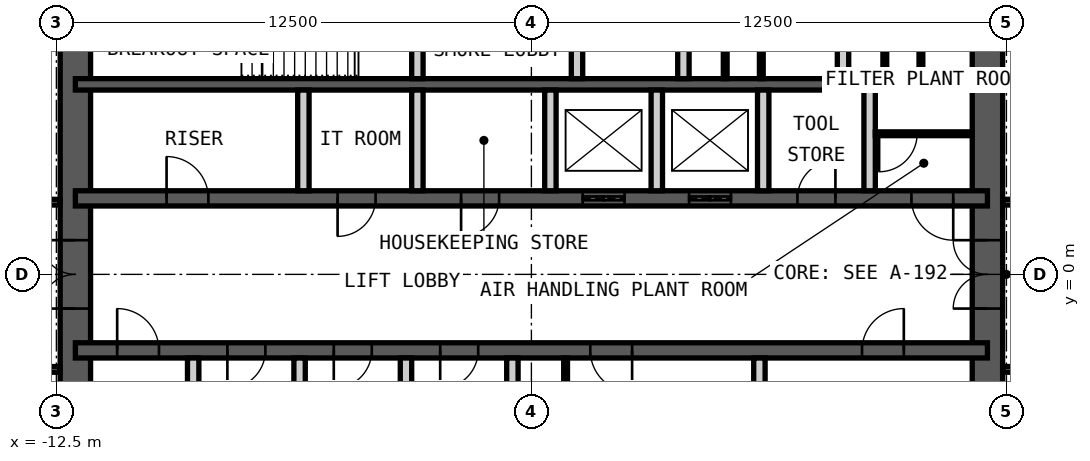
"""IFC4 building model, lengths in metres.
Left out: names, types, materials, properties, quantities, classifications, styles, units other than length and angle.
Written with IfcOpenShell. Run it as: python <this file> out.ifc"""

import sys

from ifc_helpers import new_model, si_unit, direction, frame, frame_2d, origin, place, context, subcontext, project, spatial, rectangle, extrude, element, fill, save


model = new_model("IFC4")
c1 = context("Model", 3, precision=1e-05, world=origin(), true_north=direction((0.0, 1.0)))
c2 = subcontext(c1, "Body", "Model", "MODEL_VIEW")
j1 = project(units=[si_unit("LENGTHUNIT", "METRE"), si_unit("PLANEANGLEUNIT", "RADIAN")], contexts=[c1])
p1 = place(None, origin())
s1 = spatial("IfcSite", under=j1, at=p1, CompositionType="ELEMENT")
p2 = place(p1, origin())
s2 = spatial("IfcBuilding", under=s1, at=p2, CompositionType="ELEMENT")
p3 = place(p2, frame((0.0, 0.0, 308.2)))
s3 = spatial("IfcBuildingStorey", under=s2, at=p3, CompositionType="ELEMENT", Elevation=308.2)
p4 = place(p3, frame((12.0, -9.0, 0.0), z_axis=(0.0, 0.0, 1.0), x_axis=(0.0, 1.0, 0.0)))
e1 = element("IfcWall", 1, at=p4, inside=s3, PredefinedType="SHEAR", context=c2, shape_type="SweptSolid", body=[
    extrude(rectangle(XDim=18.0, YDim=0.8, at=frame_2d((9.0, 0.0))), origin(), (0.0, 0.0, 1.0), 4.2),
])
p5 = place(p4, frame((8.1, 0.0, 0.0)))
e2 = element("IfcOpeningElement", 2, at=p5, cuts=e1, PredefinedType="OPENING", context=c2, shape_type="SweptSolid", body=[
    extrude(rectangle(XDim=1.8, YDim=2.1, at=frame_2d((0.9, 1.05))), frame((0.0, 0.41, 0.0), z_axis=(0.0, -1.0, 0.0), x_axis=(1.0, 0.0, 0.0)), (0.0, 0.0, 1.0), 0.82),
])
p6 = place(p3, frame((-12.0, -9.0, 0.0), z_axis=(0.0, 0.0, 1.0), x_axis=(0.0, 1.0, 0.0)))
e3 = element("IfcWall", 3, at=p6, inside=s3, PredefinedType="SHEAR", context=c2, shape_type="SweptSolid", body=[
    extrude(rectangle(XDim=18.0, YDim=0.8, at=frame_2d((9.0, 0.0))), origin(), (0.0, 0.0, 1.0), 4.2),
])
p7 = place(p6, frame((8.1, 0.0, 0.0)))
e4 = element("IfcOpeningElement", 4, at=p7, cuts=e3, PredefinedType="OPENING", context=c2, shape_type="SweptSolid", body=[
    extrude(rectangle(XDim=1.8, YDim=2.1, at=frame_2d((0.9, 1.05))), frame((0.0, 0.41, 0.0), z_axis=(0.0, -1.0, 0.0), x_axis=(1.0, 0.0, 0.0)), (0.0, 0.0, 1.0), 0.82),
])
p8 = place(p3, frame((-12.0, 5.0, 0.0), z_axis=(0.0, 0.0, 1.0), x_axis=(1.0, 0.0, 0.0)))
e5 = element("IfcWall", 5, at=p8, inside=s3, PredefinedType="SHEAR", context=c2, shape_type="SweptSolid", body=[
    extrude(rectangle(XDim=24.0, YDim=0.3, at=frame_2d((12.0, 0.0))), origin(), (0.0, 0.0, 1.0), 4.2),
])
p9 = place(p3, frame((-12.0, 2.0, 0.0), z_axis=(0.0, 0.0, 1.0), x_axis=(1.0, 0.0, 0.0)))
e6 = element("IfcWall", 6, at=p9, inside=s3, PredefinedType="SHEAR", context=c2, shape_type="SweptSolid", body=[
    extrude(rectangle(XDim=24.0, YDim=0.4, at=frame_2d((12.0, 0.0))), origin(), (0.0, 0.0, 1.0), 4.2),
])
p10 = place(p9, frame((2.4, 0.0, 0.0)))
e7 = element("IfcOpeningElement", 7, at=p10, cuts=e6, PredefinedType="OPENING", context=c2, shape_type="SweptSolid", body=[
    extrude(rectangle(XDim=1.1, YDim=2.1, at=frame_2d((0.55, 1.05))), frame((0.0, 0.21, 0.0), z_axis=(0.0, -1.0, 0.0), x_axis=(1.0, 0.0, 0.0)), (0.0, 0.0, 1.0), 0.42),
])
p11 = place(p9, frame((22.0, 0.0, 0.0)))
e8 = element("IfcOpeningElement", 8, at=p11, cuts=e6, PredefinedType="OPENING", context=c2, shape_type="SweptSolid", body=[
    extrude(rectangle(XDim=1.1, YDim=2.1, at=frame_2d((0.55, 1.05))), frame((0.0, 0.21, 0.0), z_axis=(0.0, -1.0, 0.0), x_axis=(1.0, 0.0, 0.0)), (0.0, 0.0, 1.0), 0.42),
])
p12 = place(p9, frame((10.15, 0.0, 0.0)))
e9 = element("IfcOpeningElement", 9, at=p12, cuts=e6, PredefinedType="OPENING", context=c2, shape_type="SweptSolid", body=[
    extrude(rectangle(XDim=1.0, YDim=2.1, at=frame_2d((0.5, 1.05))), frame((0.0, 0.21, 0.0), z_axis=(0.0, -1.0, 0.0), x_axis=(1.0, 0.0, 0.0)), (0.0, 0.0, 1.0), 0.42),
])
p13 = place(p9, frame((6.9, 0.0, 0.0)))
e10 = element("IfcOpeningElement", 10, at=p13, cuts=e6, PredefinedType="OPENING", context=c2, shape_type="SweptSolid", body=[
    extrude(rectangle(XDim=1.0, YDim=2.1, at=frame_2d((0.5, 1.05))), frame((0.0, 0.21, 0.0), z_axis=(0.0, -1.0, 0.0), x_axis=(1.0, 0.0, 0.0)), (0.0, 0.0, 1.0), 0.42),
])
p14 = place(p9, frame((13.35, 0.0, 0.0)))
e11 = element("IfcOpeningElement", 11, at=p14, cuts=e6, PredefinedType="OPENING", context=c2, shape_type="SweptSolid", body=[
    extrude(rectangle(XDim=1.1, YDim=2.4, at=frame_2d((0.55, 1.2))), frame((0.0, 0.21, 0.0), z_axis=(0.0, -1.0, 0.0), x_axis=(1.0, 0.0, 0.0)), (0.0, 0.0, 1.0), 0.42),
])
p15 = place(p9, frame((16.15, 0.0, 0.0)))
e12 = element("IfcOpeningElement", 12, at=p15, cuts=e6, PredefinedType="OPENING", context=c2, shape_type="SweptSolid", body=[
    extrude(rectangle(XDim=1.1, YDim=2.4, at=frame_2d((0.55, 1.2))), frame((0.0, 0.21, 0.0), z_axis=(0.0, -1.0, 0.0), x_axis=(1.0, 0.0, 0.0)), (0.0, 0.0, 1.0), 0.42),
])
p16 = place(p9, frame((19.0, 0.0, 0.0)))
e13 = element("IfcOpeningElement", 13, at=p16, cuts=e6, PredefinedType="OPENING", context=c2, shape_type="SweptSolid", body=[
    extrude(rectangle(XDim=1.0, YDim=2.1, at=frame_2d((0.5, 1.05))), frame((0.0, 0.21, 0.0), z_axis=(0.0, -1.0, 0.0), x_axis=(1.0, 0.0, 0.0)), (0.0, 0.0, 1.0), 0.42),
])
p17 = place(p3, frame((-12.0, -2.0, 0.0), z_axis=(0.0, 0.0, 1.0), x_axis=(1.0, 0.0, 0.0)))
e14 = element("IfcWall", 14, at=p17, inside=s3, PredefinedType="SHEAR", context=c2, shape_type="SweptSolid", body=[
    extrude(rectangle(XDim=24.0, YDim=0.4, at=frame_2d((12.0, 0.0))), origin(), (0.0, 0.0, 1.0), 4.2),
])
p18 = place(p17, frame((1.1, 0.0, 0.0)))
e15 = element("IfcOpeningElement", 15, at=p18, cuts=e14, PredefinedType="OPENING", context=c2, shape_type="SweptSolid", body=[
    extrude(rectangle(XDim=1.1, YDim=2.1, at=frame_2d((0.55, 1.05))), frame((0.0, 0.21, 0.0), z_axis=(0.0, -1.0, 0.0), x_axis=(1.0, 0.0, 0.0)), (0.0, 0.0, 1.0), 0.42),
])
p19 = place(p17, frame((13.55, 0.0, 0.0)))
e16 = element("IfcOpeningElement", 16, at=p19, cuts=e14, PredefinedType="OPENING", context=c2, shape_type="SweptSolid", body=[
    extrude(rectangle(XDim=1.1, YDim=2.1, at=frame_2d((0.55, 1.05))), frame((0.0, 0.21, 0.0), z_axis=(0.0, -1.0, 0.0), x_axis=(1.0, 0.0, 0.0)), (0.0, 0.0, 1.0), 0.42),
])
p20 = place(p17, frame((20.7, 0.0, 0.0)))
e17 = element("IfcOpeningElement", 17, at=p20, cuts=e14, PredefinedType="OPENING", context=c2, shape_type="SweptSolid", body=[
    extrude(rectangle(XDim=1.1, YDim=2.1, at=frame_2d((0.55, 1.05))), frame((0.0, 0.21, 0.0), z_axis=(0.0, -1.0, 0.0), x_axis=(1.0, 0.0, 0.0)), (0.0, 0.0, 1.0), 0.42),
])
p21 = place(p17, frame((4.0, 0.0, 0.0)))
e18 = element("IfcOpeningElement", 18, at=p21, cuts=e14, PredefinedType="OPENING", context=c2, shape_type="SweptSolid", body=[
    extrude(rectangle(XDim=1.0, YDim=2.1, at=frame_2d((0.5, 1.05))), frame((0.0, 0.21, 0.0), z_axis=(0.0, -1.0, 0.0), x_axis=(1.0, 0.0, 0.0)), (0.0, 0.0, 1.0), 0.42),
])
p22 = place(p17, frame((6.8, 0.0, 0.0)))
e19 = element("IfcOpeningElement", 19, at=p22, cuts=e14, PredefinedType="OPENING", context=c2, shape_type="SweptSolid", body=[
    extrude(rectangle(XDim=1.0, YDim=2.1, at=frame_2d((0.5, 1.05))), frame((0.0, 0.21, 0.0), z_axis=(0.0, -1.0, 0.0), x_axis=(1.0, 0.0, 0.0)), (0.0, 0.0, 1.0), 0.42),
])
p23 = place(p17, frame((9.6, 0.0, 0.0)))
e20 = element("IfcOpeningElement", 20, at=p23, cuts=e14, PredefinedType="OPENING", context=c2, shape_type="SweptSolid", body=[
    extrude(rectangle(XDim=1.0, YDim=2.1, at=frame_2d((0.5, 1.05))), frame((0.0, 0.21, 0.0), z_axis=(0.0, -1.0, 0.0), x_axis=(1.0, 0.0, 0.0)), (0.0, 0.0, 1.0), 0.42),
])
p24 = place(p3, frame((-3.0, 5.15, 0.0), z_axis=(0.0, 0.0, 1.0), x_axis=(0.0, 1.0, 0.0)))
e21 = element("IfcWall", 21, at=p24, inside=s3, PredefinedType="PARTITIONING", context=c2, shape_type="SweptSolid", body=[
    extrude(rectangle(XDim=3.85, YDim=0.3, at=frame_2d((1.925, 0.0))), origin(), (0.0, 0.0, 1.0), 3.98),
])
p25 = place(p24, frame((1.425, 0.0, 0.0)))
e22 = element("IfcOpeningElement", 22, at=p25, cuts=e21, PredefinedType="OPENING", context=c2, shape_type="SweptSolid", body=[
    extrude(rectangle(XDim=1.0, YDim=2.1, at=frame_2d((0.5, 1.05))), frame((0.0, 0.16, 0.0), z_axis=(0.0, -1.0, 0.0), x_axis=(1.0, 0.0, 0.0)), (0.0, 0.0, 1.0), 0.32),
])
p26 = place(p3, frame((1.2, 5.15, 0.0), z_axis=(0.0, 0.0, 1.0), x_axis=(0.0, 1.0, 0.0)))
e23 = element("IfcWall", 23, at=p26, inside=s3, PredefinedType="PARTITIONING", context=c2, shape_type="SweptSolid", body=[
    extrude(rectangle(XDim=3.85, YDim=0.3, at=frame_2d((1.925, 0.0))), origin(), (0.0, 0.0, 1.0), 3.98),
])
p27 = place(p26, frame((1.375, 0.0, 0.0)))
e24 = element("IfcOpeningElement", 24, at=p27, cuts=e23, PredefinedType="OPENING", context=c2, shape_type="SweptSolid", body=[
    extrude(rectangle(XDim=1.1, YDim=2.4, at=frame_2d((0.55, 1.2))), frame((0.0, 0.16, 0.0), z_axis=(0.0, -1.0, 0.0), x_axis=(1.0, 0.0, 0.0)), (0.0, 0.0, 1.0), 0.32),
])
for number, where, z_axis, x_axis in (
    (25, (4.0, 5.15, 0.0), (0.0, 0.0, 1.0), (0.0, 1.0, 0.0)),
    (26, (8.2, 5.15, 0.0), (0.0, 0.0, 1.0), (0.0, 1.0, 0.0)),
):
    element("IfcWall", number, at=place(p3, frame(where, z_axis=z_axis, x_axis=x_axis)), inside=s3, PredefinedType="PARTITIONING", context=c2, shape_type="SweptSolid", body=[
        extrude(rectangle(XDim=3.85, YDim=0.3, at=frame_2d((1.925, 0.0))), origin(), (0.0, 0.0, 1.0), 3.98),
    ])
for number, where, z_axis, x_axis in (
    (27, (-6.0, 2.2, 0.0), (0.0, 0.0, 1.0), (0.0, 1.0, 0.0)),
    (28, (-3.0, 2.2, 0.0), (0.0, 0.0, 1.0), (0.0, 1.0, 0.0)),
    (29, (0.5, 2.2, 0.0), (0.0, 0.0, 1.0), (0.0, 1.0, 0.0)),
    (30, (3.3, 2.2, 0.0), (0.0, 0.0, 1.0), (0.0, 1.0, 0.0)),
    (31, (6.1, 2.2, 0.0), (0.0, 0.0, 1.0), (0.0, 1.0, 0.0)),
    (32, (8.9, 2.2, 0.0), (0.0, 0.0, 1.0), (0.0, 1.0, 0.0)),
    (33, (-8.9, -4.85, 0.0), (0.0, 0.0, 1.0), (0.0, 1.0, 0.0)),
    (34, (-6.1, -4.85, 0.0), (0.0, 0.0, 1.0), (0.0, 1.0, 0.0)),
    (35, (-3.3, -4.85, 0.0), (0.0, 0.0, 1.0), (0.0, 1.0, 0.0)),
    (36, (-0.5, -4.85, 0.0), (0.0, 0.0, 1.0), (0.0, 1.0, 0.0)),
    (37, (6.0, -4.85, 0.0), (0.0, 0.0, 1.0), (0.0, 1.0, 0.0)),
):
    element("IfcWall", number, at=place(p3, frame(where, z_axis=z_axis, x_axis=x_axis)), inside=s3, PredefinedType="PARTITIONING", context=c2, shape_type="SweptSolid", body=[
        extrude(rectangle(XDim=2.65, YDim=0.3, at=frame_2d((1.325, 0.0))), origin(), (0.0, 0.0, 1.0), 3.98),
    ])
p28 = place(p3, frame((0.9, -4.85, 0.0), z_axis=(0.0, 0.0, 1.0), x_axis=(0.0, 1.0, 0.0)))
e38 = element("IfcWall", 38, at=p28, inside=s3, PredefinedType="PARTITIONING", context=c2, shape_type="SweptSolid", body=[
    extrude(rectangle(XDim=2.65, YDim=0.1, at=frame_2d((1.325, 0.0))), origin(), (0.0, 0.0, 1.0), 3.98),
])
p29 = place(p28, frame((0.1, 0.0, 0.0)))
e39 = element("IfcOpeningElement", 39, at=p29, cuts=e38, PredefinedType="OPENING", context=c2, shape_type="SweptSolid", body=[
    extrude(rectangle(XDim=1.0, YDim=2.4, at=frame_2d((0.5, 1.2))), frame((0.0, 0.06, 0.0), z_axis=(0.0, -1.0, 0.0), x_axis=(1.0, 0.0, 0.0)), (0.0, 0.0, 1.0), 0.12),
])
p30 = place(p3, frame((9.05, 3.7, 0.0), z_axis=(0.0, 0.0, 1.0), x_axis=(1.0, 0.0, 0.0)))
e40 = element("IfcWall", 40, at=p30, inside=s3, PredefinedType="PARTITIONING", context=c2, shape_type="SweptSolid", body=[
    extrude(rectangle(XDim=2.55, YDim=0.1, at=frame_2d((1.275, 0.0))), origin(), (0.0, 0.0, 1.0), 3.98),
])
p31 = place(p30, frame((0.1, 0.0, 0.0)))
e41 = element("IfcOpeningElement", 41, at=p31, cuts=e40, PredefinedType="OPENING", context=c2, shape_type="SweptSolid", body=[
    extrude(rectangle(XDim=1.0, YDim=2.4, at=frame_2d((0.5, 1.2))), frame((0.0, 0.06, 0.0), z_axis=(0.0, -1.0, 0.0), x_axis=(1.0, 0.0, 0.0)), (0.0, 0.0, 1.0), 0.12),
])
for number, where, z_axis, x_axis in (
    (42, (5.1, 5.15, 0.0), (0.0, 0.0, 1.0), (0.0, 1.0, 0.0)),
    (43, (6.05, 5.15, 0.0), (0.0, 0.0, 1.0), (0.0, 1.0, 0.0)),
    (44, (9.3, 5.15, 0.0), (0.0, 0.0, 1.0), (0.0, 1.0, 0.0)),
    (45, (10.25, 5.15, 0.0), (0.0, 0.0, 1.0), (0.0, 1.0, 0.0)),
):
    element("IfcWall", number, at=place(p3, frame(where, z_axis=z_axis, x_axis=x_axis)), inside=s3, PredefinedType="PARTITIONING", context=c2, shape_type="SweptSolid", body=[
        extrude(rectangle(XDim=1.5, YDim=0.1, at=frame_2d((0.75, 0.0))), origin(), (0.0, 0.0, 1.0), 2.1),
    ])
p32 = place(p3, frame((12.4, 1.9, 0.0), z_axis=(0.0, 0.0, 1.0), x_axis=(1.0, 0.0, 0.0)))
e46 = element("IfcWall", 46, at=p32, inside=s3, PredefinedType="PARTITIONING", context=c2, shape_type="SweptSolid", body=[
    extrude(rectangle(XDim=2.1, YDim=0.15, at=frame_2d((1.05, 0.0))), origin(), (0.0, 0.0, 1.0), 2.93),
])
p33 = place(p3, frame((12.4, -2.5, 0.0), z_axis=(0.0, 0.0, 1.0), x_axis=(1.0, 0.0, 0.0)))
e47 = element("IfcWall", 47, at=p33, inside=s3, PredefinedType="PARTITIONING", context=c2, shape_type="SweptSolid", body=[
    extrude(rectangle(XDim=2.1, YDim=0.15, at=frame_2d((1.05, 0.0))), origin(), (0.0, 0.0, 1.0), 3.33),
])
for number, where, z_axis, x_axis in (
    (48, (-12.4, 1.9, 0.0), (0.0, 0.0, 1.0), (-1.0, 0.0, 0.0)),
    (49, (-12.4, -2.5, 0.0), (0.0, 0.0, 1.0), (-1.0, 0.0, 0.0)),
):
    element("IfcWall", number, at=place(p3, frame(where, z_axis=z_axis, x_axis=x_axis)), inside=s3, PredefinedType="PARTITIONING", context=c2, shape_type="SweptSolid", body=[
        extrude(rectangle(XDim=2.1, YDim=0.15, at=frame_2d((1.05, 0.0))), origin(), (0.0, 0.0, 1.0), 3.53),
    ])
p34 = place(p10, origin())
e50 = element("IfcDoor", 50, at=p34, inside=s3, OperationType="SINGLE_SWING_RIGHT", PredefinedType="DOOR", context=c2, shape_type="SweptSolid", body=[
    extrude(rectangle(XDim=1.1, YDim=2.1, at=frame_2d((0.55, 1.05))), frame((0.0, 0.025, 0.0), z_axis=(0.0, -1.0, 0.0), x_axis=(1.0, 0.0, 0.0)), (0.0, 0.0, 1.0), 0.05),
])
fill(e7, e50)
p35 = place(p18, origin())
e51 = element("IfcDoor", 51, at=p35, inside=s3, OperationType="SINGLE_SWING_RIGHT", PredefinedType="DOOR", context=c2, shape_type="SweptSolid", body=[
    extrude(rectangle(XDim=1.1, YDim=2.1, at=frame_2d((0.55, 1.05))), frame((0.0, 0.025, 0.0), z_axis=(0.0, -1.0, 0.0), x_axis=(1.0, 0.0, 0.0)), (0.0, 0.0, 1.0), 0.05),
])
fill(e15, e51)
p36 = place(p11, origin())
e52 = element("IfcDoor", 52, at=p36, inside=s3, OperationType="SINGLE_SWING_RIGHT", PredefinedType="DOOR", context=c2, shape_type="SweptSolid", body=[
    extrude(rectangle(XDim=1.1, YDim=2.1, at=frame_2d((0.55, 1.05))), frame((0.0, 0.025, 0.0), z_axis=(0.0, -1.0, 0.0), x_axis=(1.0, 0.0, 0.0)), (0.0, 0.0, 1.0), 0.05),
])
fill(e8, e52)
p37 = place(p12, origin())
e53 = element("IfcDoor", 53, at=p37, inside=s3, OperationType="SINGLE_SWING_LEFT", PredefinedType="DOOR", context=c2, shape_type="SweptSolid", body=[
    extrude(rectangle(XDim=1.0, YDim=2.1, at=frame_2d((0.5, 1.05))), frame((0.0, 0.025, 0.0), z_axis=(0.0, -1.0, 0.0), x_axis=(1.0, 0.0, 0.0)), (0.0, 0.0, 1.0), 0.05),
])
fill(e9, e53)
p38 = place(p19, origin())
e54 = element("IfcDoor", 54, at=p38, inside=s3, OperationType="SINGLE_SWING_RIGHT", PredefinedType="DOOR", context=c2, shape_type="SweptSolid", body=[
    extrude(rectangle(XDim=1.1, YDim=2.1, at=frame_2d((0.55, 1.05))), frame((0.0, 0.025, 0.0), z_axis=(0.0, -1.0, 0.0), x_axis=(1.0, 0.0, 0.0)), (0.0, 0.0, 1.0), 0.05),
])
fill(e16, e54)
p39 = place(p20, origin())
e55 = element("IfcDoor", 55, at=p39, inside=s3, OperationType="SINGLE_SWING_LEFT", PredefinedType="DOOR", context=c2, shape_type="SweptSolid", body=[
    extrude(rectangle(XDim=1.1, YDim=2.1, at=frame_2d((0.55, 1.05))), frame((0.0, 0.025, 0.0), z_axis=(0.0, -1.0, 0.0), x_axis=(1.0, 0.0, 0.0)), (0.0, 0.0, 1.0), 0.05),
])
fill(e17, e55)
p40 = place(p5, origin())
e56 = element("IfcDoor", 56, at=p40, inside=s3, OperationType="DOUBLE_DOOR_DOUBLE_SWING", PredefinedType="DOOR", context=c2, shape_type="SweptSolid", body=[
    extrude(rectangle(XDim=1.8, YDim=2.1, at=frame_2d((0.9, 1.05))), frame((0.0, 0.025, 0.0), z_axis=(0.0, -1.0, 0.0), x_axis=(1.0, 0.0, 0.0)), (0.0, 0.0, 1.0), 0.05),
])
fill(e2, e56)
p41 = place(p7, origin())
e57 = element("IfcDoor", 57, at=p41, inside=s3, OperationType="DOUBLE_DOOR_DOUBLE_SWING", PredefinedType="DOOR", context=c2, shape_type="SweptSolid", body=[
    extrude(rectangle(XDim=1.8, YDim=2.1, at=frame_2d((0.9, 1.05))), frame((0.0, 0.025, 0.0), z_axis=(0.0, -1.0, 0.0), x_axis=(1.0, 0.0, 0.0)), (0.0, 0.0, 1.0), 0.05),
])
fill(e4, e57)
p42 = place(p13, origin())
e58 = element("IfcDoor", 58, at=p42, inside=s3, OperationType="SINGLE_SWING_LEFT", PredefinedType="DOOR", context=c2, shape_type="SweptSolid", body=[
    extrude(rectangle(XDim=1.0, YDim=2.1, at=frame_2d((0.5, 1.05))), frame((0.0, 0.025, 0.0), z_axis=(0.0, -1.0, 0.0), x_axis=(1.0, 0.0, 0.0)), (0.0, 0.0, 1.0), 0.05),
])
fill(e10, e58)
p43 = place(p14, origin())
e59 = element("IfcDoor", 59, at=p43, inside=s3, OperationType="DOUBLE_DOOR_SLIDING", PredefinedType="DOOR", context=c2, shape_type="SweptSolid", body=[
    extrude(rectangle(XDim=1.1, YDim=2.4, at=frame_2d((0.55, 1.2))), frame((0.0, 0.025, 0.0), z_axis=(0.0, -1.0, 0.0), x_axis=(1.0, 0.0, 0.0)), (0.0, 0.0, 1.0), 0.05),
])
fill(e11, e59)
p44 = place(p15, origin())
e60 = element("IfcDoor", 60, at=p44, inside=s3, OperationType="DOUBLE_DOOR_SLIDING", PredefinedType="DOOR", context=c2, shape_type="SweptSolid", body=[
    extrude(rectangle(XDim=1.1, YDim=2.4, at=frame_2d((0.55, 1.2))), frame((0.0, 0.025, 0.0), z_axis=(0.0, -1.0, 0.0), x_axis=(1.0, 0.0, 0.0)), (0.0, 0.0, 1.0), 0.05),
])
fill(e12, e60)
p45 = place(p16, origin())
e61 = element("IfcDoor", 61, at=p45, inside=s3, OperationType="SINGLE_SWING_LEFT", PredefinedType="DOOR", context=c2, shape_type="SweptSolid", body=[
    extrude(rectangle(XDim=1.0, YDim=2.1, at=frame_2d((0.5, 1.05))), frame((0.0, 0.025, 0.0), z_axis=(0.0, -1.0, 0.0), x_axis=(1.0, 0.0, 0.0)), (0.0, 0.0, 1.0), 0.05),
])
fill(e13, e61)
p46 = place(p21, origin())
e62 = element("IfcDoor", 62, at=p46, inside=s3, OperationType="SINGLE_SWING_LEFT", PredefinedType="DOOR", context=c2, shape_type="SweptSolid", body=[
    extrude(rectangle(XDim=1.0, YDim=2.1, at=frame_2d((0.5, 1.05))), frame((0.0, 0.025, 0.0), z_axis=(0.0, -1.0, 0.0), x_axis=(1.0, 0.0, 0.0)), (0.0, 0.0, 1.0), 0.05),
])
fill(e18, e62)
p47 = place(p22, origin())
e63 = element("IfcDoor", 63, at=p47, inside=s3, OperationType="SINGLE_SWING_LEFT", PredefinedType="DOOR", context=c2, shape_type="SweptSolid", body=[
    extrude(rectangle(XDim=1.0, YDim=2.1, at=frame_2d((0.5, 1.05))), frame((0.0, 0.025, 0.0), z_axis=(0.0, -1.0, 0.0), x_axis=(1.0, 0.0, 0.0)), (0.0, 0.0, 1.0), 0.05),
])
fill(e19, e63)
p48 = place(p23, origin())
e64 = element("IfcDoor", 64, at=p48, inside=s3, OperationType="SINGLE_SWING_LEFT", PredefinedType="DOOR", context=c2, shape_type="SweptSolid", body=[
    extrude(rectangle(XDim=1.0, YDim=2.1, at=frame_2d((0.5, 1.05))), frame((0.0, 0.025, 0.0), z_axis=(0.0, -1.0, 0.0), x_axis=(1.0, 0.0, 0.0)), (0.0, 0.0, 1.0), 0.05),
])
fill(e20, e64)
p49 = place(p31, origin())
e65 = element("IfcDoor", 65, at=p49, inside=s3, OperationType="SINGLE_SWING_LEFT", PredefinedType="DOOR", context=c2, shape_type="SweptSolid", body=[
    extrude(rectangle(XDim=1.0, YDim=2.4, at=frame_2d((0.5, 1.2))), frame((0.0, 0.025, 0.0), z_axis=(0.0, -1.0, 0.0), x_axis=(1.0, 0.0, 0.0)), (0.0, 0.0, 1.0), 0.05),
])
fill(e41, e65)
save(model, sys.argv[1])
